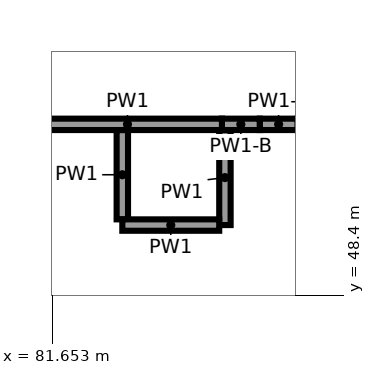
"""IFC4 building model, lengths in metres.
Left out: names, types, materials, properties, quantities, classifications, styles, units other than length and angle.
Written with IfcOpenShell. Run it as: python <this file> out.ifc"""

import sys

from ifc_helpers import new_model, si_unit, direction, frame, frame_2d, origin, place, context, subcontext, project, spatial, rectangle, extrude, element, save


model = new_model("IFC4")
c1 = context("Model", 3, precision=1e-05, world=origin(), true_north=direction((0.0, 1.0)))
c2 = subcontext(c1, "Body", "Model", "MODEL_VIEW")
j1 = project(units=[si_unit("LENGTHUNIT", "METRE"), si_unit("PLANEANGLEUNIT", "RADIAN")], contexts=[c1])
p1 = place(None, origin())
s1 = spatial("IfcSite", under=j1, at=p1, CompositionType="ELEMENT")
p2 = place(p1, origin())
s2 = spatial("IfcBuilding", under=s1, at=p2, CompositionType="ELEMENT")
p3 = place(p2, frame((0.0, 0.0, -4.0)))
s3 = spatial("IfcBuildingStorey", under=s2, at=p3, CompositionType="ELEMENT", Elevation=-4.0)
for number, where, z_axis, x_axis in (
    (1, (84.88, 50.65, 0.0), (0.0, 0.0, 1.0), (-1.0, 0.0, 0.0)),
    (2, (84.383, 50.65, 0.0), (0.0, 0.0, 1.0), (-1.0, 0.0, 0.0)),
):
    element("IfcWall", number, at=place(p3, frame(where, z_axis=z_axis, x_axis=x_axis)), inside=s3, PredefinedType="PARTITIONING", context=c2, shape_type="SweptSolid", body=[
        extrude(rectangle(XDim=0.497, YDim=0.15, at=frame_2d((0.249, 0.0))), origin(), (0.0, 0.0, 1.0), 2.5),
    ])
p4 = place(p3, frame((83.886, 50.65, 0.0), z_axis=(0.0, 0.0, 1.0), x_axis=(-1.0, 0.0, 0.0)))
e3 = element("IfcWall", 3, at=p4, inside=s3, PredefinedType="PARTITIONING", context=c2, shape_type="SweptSolid", body=[
    extrude(rectangle(XDim=2.486, YDim=0.15, at=frame_2d((1.243, 0.0))), origin(), (0.0, 0.0, 1.0), 3.6),
])
p5 = place(p3, frame((83.925, 49.325, 0.0), z_axis=(0.0, 0.0, 1.0), x_axis=(0.0, 1.0, 0.0)))
e4 = element("IfcWall", 4, at=p5, inside=s3, PredefinedType="PARTITIONING", context=c2, shape_type="SweptSolid", body=[
    extrude(rectangle(XDim=1.249, YDim=0.15, at=frame_2d((0.625, 0.0))), origin(), (0.0, 0.0, 1.0), 3.6),
])
p6 = place(p3, frame((82.575, 50.574, 0.0), z_axis=(0.0, 0.0, 1.0), x_axis=(0.0, -1.0, 0.0)))
e5 = element("IfcWall", 5, at=p6, inside=s3, PredefinedType="PARTITIONING", context=c2, shape_type="SweptSolid", body=[
    extrude(rectangle(XDim=1.174, YDim=0.15, at=frame_2d((0.587, 0.0))), origin(), (0.0, 0.0, 1.0), 3.6),
])
p7 = place(p3, frame((82.575, 49.325, 0.0), z_axis=(0.0, 0.0, 1.0), x_axis=(1.0, 0.0, 0.0)))
e6 = element("IfcWall", 6, at=p7, inside=s3, PredefinedType="PARTITIONING", context=c2, shape_type="SweptSolid", body=[
    extrude(rectangle(XDim=1.275, YDim=0.15, at=frame_2d((0.638, 0.0))), origin(), (0.0, 0.0, 1.0), 3.6),
])
save(model, sys.argv[1])
